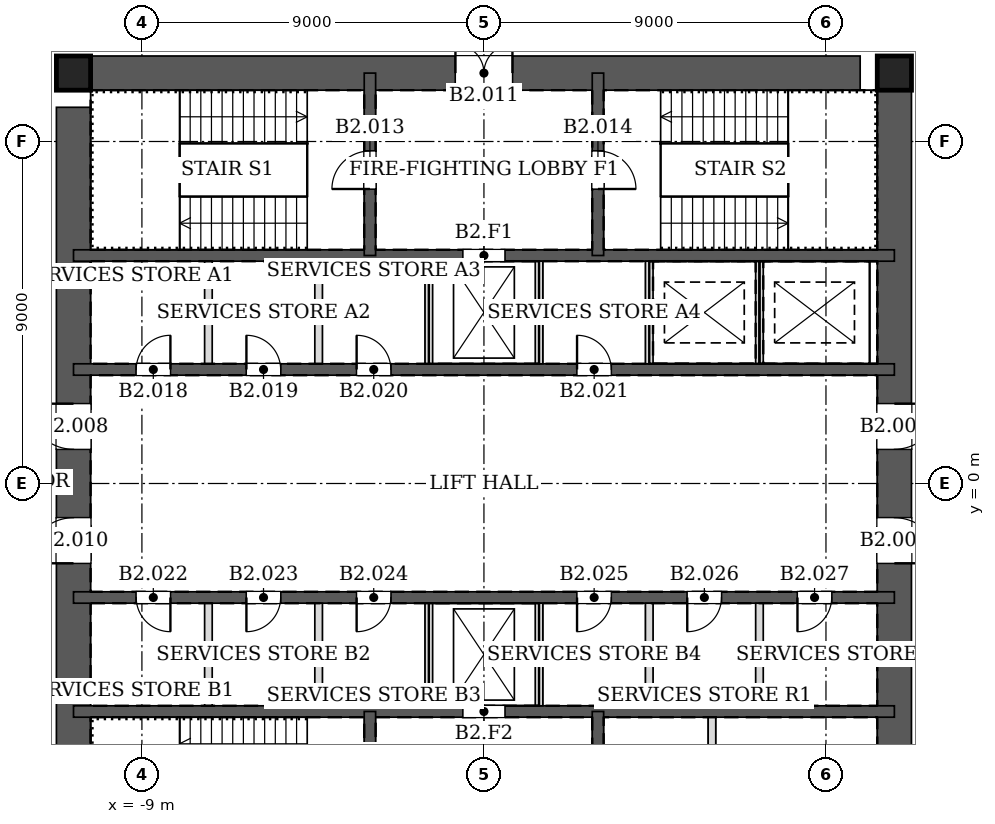
"""IFC4 building model, lengths in metres.
Left out: names, types, materials, properties, quantities, classifications, styles, units other than length and angle.
Written with IfcOpenShell. Run it as: python <this file> out.ifc"""

import sys

from ifc_helpers import new_model, si_unit, direction, frame, frame_2d, origin, origin_2d, place, context, subcontext, project, spatial, rectangle, hollow_rectangle, extrude, element, fill, save


model = new_model("IFC4")
c1 = context("Model", 3, precision=1e-05, world=origin(), true_north=direction((0.0, 1.0)))
c2 = subcontext(c1, "Body", "Model", "MODEL_VIEW")
j1 = project(units=[si_unit("LENGTHUNIT", "METRE"), si_unit("PLANEANGLEUNIT", "RADIAN")], contexts=[c1])
p1 = place(None, origin())
s1 = spatial("IfcSite", under=j1, at=p1, CompositionType="ELEMENT")
p2 = place(p1, origin())
s2 = spatial("IfcBuilding", under=s1, at=p2, CompositionType="ELEMENT")
p3 = place(p2, frame((0.0, 0.0, -9.0)))
s3 = spatial("IfcBuildingStorey", under=s2, at=p3, CompositionType="ELEMENT", Elevation=-9.0)
for number, where, z_axis, x_axis in (
    (1, (10.8, 10.8, -0.35), (0.0, 0.0, 1.0), (1.0, 0.0, 0.0)),
    (2, (-10.8, 10.8, -0.35), (0.0, 0.0, 1.0), (1.0, 0.0, 0.0)),
):
    element("IfcColumn", number, at=place(p3, frame(where, z_axis=z_axis, x_axis=x_axis)), inside=s3, PredefinedType="COLUMN", context=c2, shape_type="SweptSolid", body=[
        extrude(hollow_rectangle(XDim=0.9, YDim=0.9, WallThickness=0.06, at=origin_2d()), origin(), (0.0, 0.0, 1.0), 4.85),
    ])
p4 = place(p3, frame((10.8, -10.8, -0.35), z_axis=(0.0, 0.0, 1.0), x_axis=(0.0, 1.0, 0.0)))
e3 = element("IfcWall", 3, at=p4, inside=s3, PredefinedType="SOLIDWALL", context=c2, shape_type="SweptSolid", body=[
    extrude(rectangle(XDim=21.6, YDim=0.9, at=frame_2d((10.8, 0.0))), origin(), (0.0, 0.0, 1.0), 4.85),
])
p5 = place(p4, frame((11.7, 0.0, 0.35)))
e4 = element("IfcOpeningElement", 4, at=p5, cuts=e3, PredefinedType="OPENING", context=c2, shape_type="SweptSolid", body=[
    extrude(rectangle(XDim=1.2, YDim=2.1, at=frame_2d((0.6, 1.05))), frame((0.0, 0.46, 0.0), z_axis=(0.0, -1.0, 0.0), x_axis=(1.0, 0.0, 0.0)), (0.0, 0.0, 1.0), 0.92),
])
p6 = place(p4, frame((8.7, 0.0, 0.35)))
e5 = element("IfcOpeningElement", 5, at=p6, cuts=e3, PredefinedType="OPENING", context=c2, shape_type="SweptSolid", body=[
    extrude(rectangle(XDim=1.2, YDim=2.1, at=frame_2d((0.6, 1.05))), frame((0.0, 0.46, 0.0), z_axis=(0.0, -1.0, 0.0), x_axis=(1.0, 0.0, 0.0)), (0.0, 0.0, 1.0), 0.92),
])
p7 = place(p3, frame((10.8, 10.8, -0.35), z_axis=(0.0, 0.0, 1.0), x_axis=(-1.0, 0.0, 0.0)))
e6 = element("IfcWall", 6, at=p7, inside=s3, PredefinedType="SOLIDWALL", context=c2, shape_type="SweptSolid", body=[
    extrude(rectangle(XDim=21.6, YDim=0.9, at=frame_2d((10.8, 0.0))), origin(), (0.0, 0.0, 1.0), 4.85),
])
p8 = place(p7, frame((10.05, 0.0, 0.35)))
e7 = element("IfcOpeningElement", 7, at=p8, cuts=e6, PredefinedType="OPENING", context=c2, shape_type="SweptSolid", body=[
    extrude(rectangle(XDim=1.5, YDim=2.1, at=frame_2d((0.75, 1.05))), frame((0.0, 0.46, 0.0), z_axis=(0.0, -1.0, 0.0), x_axis=(1.0, 0.0, 0.0)), (0.0, 0.0, 1.0), 0.92),
])
p9 = place(p3, frame((-10.8, 10.8, -0.35), z_axis=(0.0, 0.0, 1.0), x_axis=(0.0, -1.0, 0.0)))
e8 = element("IfcWall", 8, at=p9, inside=s3, PredefinedType="SOLIDWALL", context=c2, shape_type="SweptSolid", body=[
    extrude(rectangle(XDim=21.6, YDim=0.9, at=frame_2d((10.8, 0.0))), origin(), (0.0, 0.0, 1.0), 4.85),
])
p10 = place(p9, frame((8.7, 0.0, 0.35)))
e9 = element("IfcOpeningElement", 9, at=p10, cuts=e8, PredefinedType="OPENING", context=c2, shape_type="SweptSolid", body=[
    extrude(rectangle(XDim=1.2, YDim=2.1, at=frame_2d((0.6, 1.05))), frame((0.0, 0.46, 0.0), z_axis=(0.0, -1.0, 0.0), x_axis=(1.0, 0.0, 0.0)), (0.0, 0.0, 1.0), 0.92),
])
p11 = place(p9, frame((11.7, 0.0, 0.35)))
e10 = element("IfcOpeningElement", 10, at=p11, cuts=e8, PredefinedType="OPENING", context=c2, shape_type="SweptSolid", body=[
    extrude(rectangle(XDim=1.2, YDim=2.1, at=frame_2d((0.6, 1.05))), frame((0.0, 0.46, 0.0), z_axis=(0.0, -1.0, 0.0), x_axis=(1.0, 0.0, 0.0)), (0.0, 0.0, 1.0), 0.92),
])
p12 = place(p3, frame((-10.8, 3.0, -0.35), z_axis=(0.0, 0.0, 1.0), x_axis=(1.0, 0.0, 0.0)))
e11 = element("IfcWall", 11, at=p12, inside=s3, PredefinedType="SOLIDWALL", context=c2, shape_type="SweptSolid", body=[
    extrude(rectangle(XDim=21.6, YDim=0.3, at=frame_2d((10.8, 0.0))), origin(), (0.0, 0.0, 1.0), 4.85),
])
p13 = place(p12, frame((1.65, 0.0, 0.35)))
e12 = element("IfcOpeningElement", 12, at=p13, cuts=e11, PredefinedType="OPENING", context=c2, shape_type="SweptSolid", body=[
    extrude(rectangle(XDim=0.9, YDim=2.1, at=frame_2d((0.45, 1.05))), frame((0.0, 0.16, 0.0), z_axis=(0.0, -1.0, 0.0), x_axis=(1.0, 0.0, 0.0)), (0.0, 0.0, 1.0), 0.32),
])
p14 = place(p12, frame((4.55, 0.0, 0.35)))
e13 = element("IfcOpeningElement", 13, at=p14, cuts=e11, PredefinedType="OPENING", context=c2, shape_type="SweptSolid", body=[
    extrude(rectangle(XDim=0.9, YDim=2.1, at=frame_2d((0.45, 1.05))), frame((0.0, 0.16, 0.0), z_axis=(0.0, -1.0, 0.0), x_axis=(1.0, 0.0, 0.0)), (0.0, 0.0, 1.0), 0.32),
])
p15 = place(p12, frame((7.45, 0.0, 0.35)))
e14 = element("IfcOpeningElement", 14, at=p15, cuts=e11, PredefinedType="OPENING", context=c2, shape_type="SweptSolid", body=[
    extrude(rectangle(XDim=0.9, YDim=2.1, at=frame_2d((0.45, 1.05))), frame((0.0, 0.16, 0.0), z_axis=(0.0, -1.0, 0.0), x_axis=(1.0, 0.0, 0.0)), (0.0, 0.0, 1.0), 0.32),
])
p16 = place(p12, frame((13.25, 0.0, 0.35)))
e15 = element("IfcOpeningElement", 15, at=p16, cuts=e11, PredefinedType="OPENING", context=c2, shape_type="SweptSolid", body=[
    extrude(rectangle(XDim=0.9, YDim=2.1, at=frame_2d((0.45, 1.05))), frame((0.0, 0.16, 0.0), z_axis=(0.0, -1.0, 0.0), x_axis=(1.0, 0.0, 0.0)), (0.0, 0.0, 1.0), 0.32),
])
p17 = place(p3, frame((-10.8, 6.0, -0.35), z_axis=(0.0, 0.0, 1.0), x_axis=(1.0, 0.0, 0.0)))
e16 = element("IfcWall", 16, at=p17, inside=s3, PredefinedType="SOLIDWALL", context=c2, shape_type="SweptSolid", body=[
    extrude(rectangle(XDim=21.6, YDim=0.3, at=frame_2d((10.8, 0.0))), origin(), (0.0, 0.0, 1.0), 4.85),
])
p18 = place(p17, frame((10.25, 0.0, 0.35)))
e17 = element("IfcOpeningElement", 17, at=p18, cuts=e16, PredefinedType="OPENING", context=c2, shape_type="SweptSolid", body=[
    extrude(rectangle(XDim=1.1, YDim=2.1, at=frame_2d((0.55, 1.05))), frame((0.0, 0.16, 0.0), z_axis=(0.0, -1.0, 0.0), x_axis=(1.0, 0.0, 0.0)), (0.0, 0.0, 1.0), 0.32),
])
p19 = place(p3, frame((-3.0, 6.0, -0.35), z_axis=(0.0, 0.0, 1.0), x_axis=(0.0, 1.0, 0.0)))
e18 = element("IfcWall", 18, at=p19, inside=s3, PredefinedType="SOLIDWALL", context=c2, shape_type="SweptSolid", body=[
    extrude(rectangle(XDim=4.8, YDim=0.3, at=frame_2d((2.4, 0.0))), origin(), (0.0, 0.0, 1.0), 4.85),
])
p20 = place(p19, frame((1.75, 0.0, 0.35)))
e19 = element("IfcOpeningElement", 19, at=p20, cuts=e18, PredefinedType="OPENING", context=c2, shape_type="SweptSolid", body=[
    extrude(rectangle(XDim=1.0, YDim=2.1, at=frame_2d((0.5, 1.05))), frame((0.0, 0.16, 0.0), z_axis=(0.0, -1.0, 0.0), x_axis=(1.0, 0.0, 0.0)), (0.0, 0.0, 1.0), 0.32),
])
p21 = place(p3, frame((3.0, 6.0, -0.35), z_axis=(0.0, 0.0, 1.0), x_axis=(0.0, 1.0, 0.0)))
e20 = element("IfcWall", 20, at=p21, inside=s3, PredefinedType="SOLIDWALL", context=c2, shape_type="SweptSolid", body=[
    extrude(rectangle(XDim=4.8, YDim=0.3, at=frame_2d((2.4, 0.0))), origin(), (0.0, 0.0, 1.0), 4.85),
])
p22 = place(p21, frame((1.75, 0.0, 0.35)))
e21 = element("IfcOpeningElement", 21, at=p22, cuts=e20, PredefinedType="OPENING", context=c2, shape_type="SweptSolid", body=[
    extrude(rectangle(XDim=1.0, YDim=2.1, at=frame_2d((0.5, 1.05))), frame((0.0, 0.16, 0.0), z_axis=(0.0, -1.0, 0.0), x_axis=(1.0, 0.0, 0.0)), (0.0, 0.0, 1.0), 0.32),
])
p23 = place(p3, frame((-10.8, -3.0, -0.35), z_axis=(0.0, 0.0, 1.0), x_axis=(1.0, 0.0, 0.0)))
e22 = element("IfcWall", 22, at=p23, inside=s3, PredefinedType="SOLIDWALL", context=c2, shape_type="SweptSolid", body=[
    extrude(rectangle(XDim=21.6, YDim=0.3, at=frame_2d((10.8, 0.0))), origin(), (0.0, 0.0, 1.0), 4.85),
])
p24 = place(p23, frame((1.65, 0.0, 0.35)))
e23 = element("IfcOpeningElement", 23, at=p24, cuts=e22, PredefinedType="OPENING", context=c2, shape_type="SweptSolid", body=[
    extrude(rectangle(XDim=0.9, YDim=2.1, at=frame_2d((0.45, 1.05))), frame((0.0, 0.16, 0.0), z_axis=(0.0, -1.0, 0.0), x_axis=(1.0, 0.0, 0.0)), (0.0, 0.0, 1.0), 0.32),
])
p25 = place(p23, frame((4.55, 0.0, 0.35)))
e24 = element("IfcOpeningElement", 24, at=p25, cuts=e22, PredefinedType="OPENING", context=c2, shape_type="SweptSolid", body=[
    extrude(rectangle(XDim=0.9, YDim=2.1, at=frame_2d((0.45, 1.05))), frame((0.0, 0.16, 0.0), z_axis=(0.0, -1.0, 0.0), x_axis=(1.0, 0.0, 0.0)), (0.0, 0.0, 1.0), 0.32),
])
p26 = place(p23, frame((7.45, 0.0, 0.35)))
e25 = element("IfcOpeningElement", 25, at=p26, cuts=e22, PredefinedType="OPENING", context=c2, shape_type="SweptSolid", body=[
    extrude(rectangle(XDim=0.9, YDim=2.1, at=frame_2d((0.45, 1.05))), frame((0.0, 0.16, 0.0), z_axis=(0.0, -1.0, 0.0), x_axis=(1.0, 0.0, 0.0)), (0.0, 0.0, 1.0), 0.32),
])
p27 = place(p23, frame((13.25, 0.0, 0.35)))
e26 = element("IfcOpeningElement", 26, at=p27, cuts=e22, PredefinedType="OPENING", context=c2, shape_type="SweptSolid", body=[
    extrude(rectangle(XDim=0.9, YDim=2.1, at=frame_2d((0.45, 1.05))), frame((0.0, 0.16, 0.0), z_axis=(0.0, -1.0, 0.0), x_axis=(1.0, 0.0, 0.0)), (0.0, 0.0, 1.0), 0.32),
])
p28 = place(p23, frame((16.15, 0.0, 0.35)))
e27 = element("IfcOpeningElement", 27, at=p28, cuts=e22, PredefinedType="OPENING", context=c2, shape_type="SweptSolid", body=[
    extrude(rectangle(XDim=0.9, YDim=2.1, at=frame_2d((0.45, 1.05))), frame((0.0, 0.16, 0.0), z_axis=(0.0, -1.0, 0.0), x_axis=(1.0, 0.0, 0.0)), (0.0, 0.0, 1.0), 0.32),
])
p29 = place(p23, frame((19.05, 0.0, 0.35)))
e28 = element("IfcOpeningElement", 28, at=p29, cuts=e22, PredefinedType="OPENING", context=c2, shape_type="SweptSolid", body=[
    extrude(rectangle(XDim=0.9, YDim=2.1, at=frame_2d((0.45, 1.05))), frame((0.0, 0.16, 0.0), z_axis=(0.0, -1.0, 0.0), x_axis=(1.0, 0.0, 0.0)), (0.0, 0.0, 1.0), 0.32),
])
p30 = place(p3, frame((-10.8, -6.0, -0.35), z_axis=(0.0, 0.0, 1.0), x_axis=(1.0, 0.0, 0.0)))
e29 = element("IfcWall", 29, at=p30, inside=s3, PredefinedType="SOLIDWALL", context=c2, shape_type="SweptSolid", body=[
    extrude(rectangle(XDim=21.6, YDim=0.3, at=frame_2d((10.8, 0.0))), origin(), (0.0, 0.0, 1.0), 4.85),
])
p31 = place(p30, frame((10.25, 0.0, 0.35)))
e30 = element("IfcOpeningElement", 30, at=p31, cuts=e29, PredefinedType="OPENING", context=c2, shape_type="SweptSolid", body=[
    extrude(rectangle(XDim=1.1, YDim=2.1, at=frame_2d((0.55, 1.05))), frame((0.0, 0.16, 0.0), z_axis=(0.0, -1.0, 0.0), x_axis=(1.0, 0.0, 0.0)), (0.0, 0.0, 1.0), 0.32),
])
p32 = place(p3, frame((-3.0, -6.0, -0.35), z_axis=(0.0, 0.0, 1.0), x_axis=(0.0, -1.0, 0.0)))
e31 = element("IfcWall", 31, at=p32, inside=s3, PredefinedType="SOLIDWALL", context=c2, shape_type="SweptSolid", body=[
    extrude(rectangle(XDim=4.8, YDim=0.3, at=frame_2d((2.4, 0.0))), origin(), (0.0, 0.0, 1.0), 4.85),
])
p33 = place(p32, frame((1.75, 0.0, 0.35)))
e32 = element("IfcOpeningElement", 32, at=p33, cuts=e31, PredefinedType="OPENING", context=c2, shape_type="SweptSolid", body=[
    extrude(rectangle(XDim=1.0, YDim=2.1, at=frame_2d((0.5, 1.05))), frame((0.0, 0.16, 0.0), z_axis=(0.0, -1.0, 0.0), x_axis=(1.0, 0.0, 0.0)), (0.0, 0.0, 1.0), 0.32),
])
p34 = place(p3, frame((3.0, -6.0, -0.35), z_axis=(0.0, 0.0, 1.0), x_axis=(0.0, -1.0, 0.0)))
e33 = element("IfcWall", 33, at=p34, inside=s3, PredefinedType="SOLIDWALL", context=c2, shape_type="SweptSolid", body=[
    extrude(rectangle(XDim=4.8, YDim=0.3, at=frame_2d((2.4, 0.0))), origin(), (0.0, 0.0, 1.0), 4.85),
])
for number, where, z_axis, x_axis in (
    (34, (-7.25, 3.15, 0.0), (0.0, 0.0, 1.0), (0.0, 1.0, 0.0)),
    (35, (-4.35, 3.15, 0.0), (0.0, 0.0, 1.0), (0.0, 1.0, 0.0)),
    (36, (-1.45, 3.15, 0.0), (0.0, 0.0, 1.0), (0.0, 1.0, 0.0)),
    (37, (1.45, 3.15, 0.0), (0.0, 0.0, 1.0), (0.0, 1.0, 0.0)),
    (38, (4.35, 3.15, 0.0), (0.0, 0.0, 1.0), (0.0, 1.0, 0.0)),
):
    element("IfcWall", number, at=place(p3, frame(where, z_axis=z_axis, x_axis=x_axis)), inside=s3, PredefinedType="PARTITIONING", context=c2, shape_type="SweptSolid", body=[
        extrude(rectangle(XDim=2.7, YDim=0.2, at=frame_2d((1.35, 0.0))), origin(), (0.0, 0.0, 1.0), 4.2),
    ])
p35 = place(p3, frame((7.25, 3.15, 0.0), z_axis=(0.0, 0.0, 1.0), x_axis=(0.0, 1.0, 0.0)))
e39 = element("IfcWall", 39, at=p35, inside=s3, PredefinedType="PARTITIONING", context=c2, shape_type="SweptSolid", body=[
    extrude(rectangle(XDim=2.7, YDim=0.2, at=frame_2d((1.35, 0.0))), origin(), (0.0, 0.0, 1.0), 4.5),
])
for number, where, z_axis, x_axis in (
    (40, (-7.25, -5.85, 0.0), (0.0, 0.0, 1.0), (0.0, 1.0, 0.0)),
    (41, (-4.35, -5.85, 0.0), (0.0, 0.0, 1.0), (0.0, 1.0, 0.0)),
    (42, (-1.45, -5.85, 0.0), (0.0, 0.0, 1.0), (0.0, 1.0, 0.0)),
    (43, (1.45, -5.85, 0.0), (0.0, 0.0, 1.0), (0.0, 1.0, 0.0)),
    (44, (4.35, -5.85, 0.0), (0.0, 0.0, 1.0), (0.0, 1.0, 0.0)),
    (45, (7.25, -5.85, 0.0), (0.0, 0.0, 1.0), (0.0, 1.0, 0.0)),
):
    element("IfcWall", number, at=place(p3, frame(where, z_axis=z_axis, x_axis=x_axis)), inside=s3, PredefinedType="PARTITIONING", context=c2, shape_type="SweptSolid", body=[
        extrude(rectangle(XDim=2.7, YDim=0.2, at=frame_2d((1.35, 0.0))), origin(), (0.0, 0.0, 1.0), 4.2),
    ])
p36 = place(p3, frame((6.0, -10.35, 0.0), z_axis=(0.0, 0.0, 1.0), x_axis=(0.0, 1.0, 0.0)))
e46 = element("IfcWall", 46, at=p36, inside=s3, PredefinedType="PARTITIONING", context=c2, shape_type="SweptSolid", body=[
    extrude(rectangle(XDim=4.2, YDim=0.2, at=frame_2d((2.1, 0.0))), origin(), (0.0, 0.0, 1.0), 4.2),
])
p37 = place(p36, frame((0.3, 0.0, 0.0)))
e47 = element("IfcOpeningElement", 47, at=p37, cuts=e46, PredefinedType="OPENING", context=c2, shape_type="SweptSolid", body=[
    extrude(rectangle(XDim=0.9, YDim=2.1, at=frame_2d((0.45, 1.05))), frame((0.0, 0.11, 0.0), z_axis=(0.0, -1.0, 0.0), x_axis=(1.0, 0.0, 0.0)), (0.0, 0.0, 1.0), 0.22),
])
p38 = place(p5, frame((1.2, 0.0, 0.0), z_axis=(0.0, 0.0, 1.0), x_axis=(-1.0, 0.0, 0.0)))
e48 = element("IfcDoor", 48, at=p38, inside=s3, OperationType="SINGLE_SWING_LEFT", PredefinedType="DOOR", context=c2, shape_type="SweptSolid", body=[
    extrude(rectangle(XDim=1.2, YDim=2.1, at=frame_2d((0.6, 1.05))), frame((0.0, 0.025, 0.0), z_axis=(0.0, -1.0, 0.0), x_axis=(1.0, 0.0, 0.0)), (0.0, 0.0, 1.0), 0.05),
])
fill(e4, e48)
p39 = place(p10, frame((1.2, 0.0, 0.0), z_axis=(0.0, 0.0, 1.0), x_axis=(-1.0, 0.0, 0.0)))
e49 = element("IfcDoor", 49, at=p39, inside=s3, OperationType="SINGLE_SWING_RIGHT", PredefinedType="DOOR", context=c2, shape_type="SweptSolid", body=[
    extrude(rectangle(XDim=1.2, YDim=2.1, at=frame_2d((0.6, 1.05))), frame((0.0, 0.025, 0.0), z_axis=(0.0, -1.0, 0.0), x_axis=(1.0, 0.0, 0.0)), (0.0, 0.0, 1.0), 0.05),
])
fill(e9, e49)
p40 = place(p6, frame((1.2, 0.0, 0.0), z_axis=(0.0, 0.0, 1.0), x_axis=(-1.0, 0.0, 0.0)))
e50 = element("IfcDoor", 50, at=p40, inside=s3, OperationType="SINGLE_SWING_RIGHT", PredefinedType="DOOR", context=c2, shape_type="SweptSolid", body=[
    extrude(rectangle(XDim=1.2, YDim=2.1, at=frame_2d((0.6, 1.05))), frame((0.0, 0.025, 0.0), z_axis=(0.0, -1.0, 0.0), x_axis=(1.0, 0.0, 0.0)), (0.0, 0.0, 1.0), 0.05),
])
fill(e5, e50)
p41 = place(p11, frame((1.2, 0.0, 0.0), z_axis=(0.0, 0.0, 1.0), x_axis=(-1.0, 0.0, 0.0)))
e51 = element("IfcDoor", 51, at=p41, inside=s3, OperationType="SINGLE_SWING_LEFT", PredefinedType="DOOR", context=c2, shape_type="SweptSolid", body=[
    extrude(rectangle(XDim=1.2, YDim=2.1, at=frame_2d((0.6, 1.05))), frame((0.0, 0.025, 0.0), z_axis=(0.0, -1.0, 0.0), x_axis=(1.0, 0.0, 0.0)), (0.0, 0.0, 1.0), 0.05),
])
fill(e10, e51)
p42 = place(p8, frame((1.5, 0.0, 0.0), z_axis=(0.0, 0.0, 1.0), x_axis=(-1.0, 0.0, 0.0)))
e52 = element("IfcDoor", 52, at=p42, inside=s3, OperationType="DOUBLE_DOOR_SINGLE_SWING", PredefinedType="DOOR", context=c2, shape_type="SweptSolid", body=[
    extrude(rectangle(XDim=1.5, YDim=2.1, at=frame_2d((0.75, 1.05))), frame((0.0, 0.025, 0.0), z_axis=(0.0, -1.0, 0.0), x_axis=(1.0, 0.0, 0.0)), (0.0, 0.0, 1.0), 0.05),
])
fill(e7, e52)
p43 = place(p20, origin())
e53 = element("IfcDoor", 53, at=p43, inside=s3, OperationType="SINGLE_SWING_LEFT", PredefinedType="DOOR", context=c2, shape_type="SweptSolid", body=[
    extrude(rectangle(XDim=1.0, YDim=2.1, at=frame_2d((0.5, 1.05))), frame((0.0, 0.025, 0.0), z_axis=(0.0, -1.0, 0.0), x_axis=(1.0, 0.0, 0.0)), (0.0, 0.0, 1.0), 0.05),
])
fill(e19, e53)
p44 = place(p22, frame((1.0, 0.0, 0.0), z_axis=(0.0, 0.0, 1.0), x_axis=(-1.0, 0.0, 0.0)))
e54 = element("IfcDoor", 54, at=p44, inside=s3, OperationType="SINGLE_SWING_RIGHT", PredefinedType="DOOR", context=c2, shape_type="SweptSolid", body=[
    extrude(rectangle(XDim=1.0, YDim=2.1, at=frame_2d((0.5, 1.05))), frame((0.0, 0.025, 0.0), z_axis=(0.0, -1.0, 0.0), x_axis=(1.0, 0.0, 0.0)), (0.0, 0.0, 1.0), 0.05),
])
fill(e21, e54)
p45 = place(p13, origin())
e55 = element("IfcDoor", 55, at=p45, inside=s3, OperationType="SINGLE_SWING_RIGHT", PredefinedType="DOOR", context=c2, shape_type="SweptSolid", body=[
    extrude(rectangle(XDim=0.9, YDim=2.1, at=frame_2d((0.45, 1.05))), frame((0.0, 0.025, 0.0), z_axis=(0.0, -1.0, 0.0), x_axis=(1.0, 0.0, 0.0)), (0.0, 0.0, 1.0), 0.05),
])
fill(e12, e55)
p46 = place(p14, origin())
e56 = element("IfcDoor", 56, at=p46, inside=s3, OperationType="SINGLE_SWING_LEFT", PredefinedType="DOOR", context=c2, shape_type="SweptSolid", body=[
    extrude(rectangle(XDim=0.9, YDim=2.1, at=frame_2d((0.45, 1.05))), frame((0.0, 0.025, 0.0), z_axis=(0.0, -1.0, 0.0), x_axis=(1.0, 0.0, 0.0)), (0.0, 0.0, 1.0), 0.05),
])
fill(e13, e56)
p47 = place(p15, origin())
e57 = element("IfcDoor", 57, at=p47, inside=s3, OperationType="SINGLE_SWING_LEFT", PredefinedType="DOOR", context=c2, shape_type="SweptSolid", body=[
    extrude(rectangle(XDim=0.9, YDim=2.1, at=frame_2d((0.45, 1.05))), frame((0.0, 0.025, 0.0), z_axis=(0.0, -1.0, 0.0), x_axis=(1.0, 0.0, 0.0)), (0.0, 0.0, 1.0), 0.05),
])
fill(e14, e57)
p48 = place(p16, origin())
e58 = element("IfcDoor", 58, at=p48, inside=s3, OperationType="SINGLE_SWING_LEFT", PredefinedType="DOOR", context=c2, shape_type="SweptSolid", body=[
    extrude(rectangle(XDim=0.9, YDim=2.1, at=frame_2d((0.45, 1.05))), frame((0.0, 0.025, 0.0), z_axis=(0.0, -1.0, 0.0), x_axis=(1.0, 0.0, 0.0)), (0.0, 0.0, 1.0), 0.05),
])
fill(e15, e58)
p49 = place(p24, frame((0.9, 0.0, 0.0), z_axis=(0.0, 0.0, 1.0), x_axis=(-1.0, 0.0, 0.0)))
e59 = element("IfcDoor", 59, at=p49, inside=s3, OperationType="SINGLE_SWING_LEFT", PredefinedType="DOOR", context=c2, shape_type="SweptSolid", body=[
    extrude(rectangle(XDim=0.9, YDim=2.1, at=frame_2d((0.45, 1.05))), frame((0.0, 0.025, 0.0), z_axis=(0.0, -1.0, 0.0), x_axis=(1.0, 0.0, 0.0)), (0.0, 0.0, 1.0), 0.05),
])
fill(e23, e59)
p50 = place(p25, frame((0.9, 0.0, 0.0), z_axis=(0.0, 0.0, 1.0), x_axis=(-1.0, 0.0, 0.0)))
e60 = element("IfcDoor", 60, at=p50, inside=s3, OperationType="SINGLE_SWING_RIGHT", PredefinedType="DOOR", context=c2, shape_type="SweptSolid", body=[
    extrude(rectangle(XDim=0.9, YDim=2.1, at=frame_2d((0.45, 1.05))), frame((0.0, 0.025, 0.0), z_axis=(0.0, -1.0, 0.0), x_axis=(1.0, 0.0, 0.0)), (0.0, 0.0, 1.0), 0.05),
])
fill(e24, e60)
p51 = place(p26, frame((0.9, 0.0, 0.0), z_axis=(0.0, 0.0, 1.0), x_axis=(-1.0, 0.0, 0.0)))
e61 = element("IfcDoor", 61, at=p51, inside=s3, OperationType="SINGLE_SWING_RIGHT", PredefinedType="DOOR", context=c2, shape_type="SweptSolid", body=[
    extrude(rectangle(XDim=0.9, YDim=2.1, at=frame_2d((0.45, 1.05))), frame((0.0, 0.025, 0.0), z_axis=(0.0, -1.0, 0.0), x_axis=(1.0, 0.0, 0.0)), (0.0, 0.0, 1.0), 0.05),
])
fill(e25, e61)
p52 = place(p27, frame((0.9, 0.0, 0.0), z_axis=(0.0, 0.0, 1.0), x_axis=(-1.0, 0.0, 0.0)))
e62 = element("IfcDoor", 62, at=p52, inside=s3, OperationType="SINGLE_SWING_RIGHT", PredefinedType="DOOR", context=c2, shape_type="SweptSolid", body=[
    extrude(rectangle(XDim=0.9, YDim=2.1, at=frame_2d((0.45, 1.05))), frame((0.0, 0.025, 0.0), z_axis=(0.0, -1.0, 0.0), x_axis=(1.0, 0.0, 0.0)), (0.0, 0.0, 1.0), 0.05),
])
fill(e26, e62)
p53 = place(p28, frame((0.9, 0.0, 0.0), z_axis=(0.0, 0.0, 1.0), x_axis=(-1.0, 0.0, 0.0)))
e63 = element("IfcDoor", 63, at=p53, inside=s3, OperationType="SINGLE_SWING_RIGHT", PredefinedType="DOOR", context=c2, shape_type="SweptSolid", body=[
    extrude(rectangle(XDim=0.9, YDim=2.1, at=frame_2d((0.45, 1.05))), frame((0.0, 0.025, 0.0), z_axis=(0.0, -1.0, 0.0), x_axis=(1.0, 0.0, 0.0)), (0.0, 0.0, 1.0), 0.05),
])
fill(e27, e63)
p54 = place(p29, frame((0.9, 0.0, 0.0), z_axis=(0.0, 0.0, 1.0), x_axis=(-1.0, 0.0, 0.0)))
e64 = element("IfcDoor", 64, at=p54, inside=s3, OperationType="SINGLE_SWING_RIGHT", PredefinedType="DOOR", context=c2, shape_type="SweptSolid", body=[
    extrude(rectangle(XDim=0.9, YDim=2.1, at=frame_2d((0.45, 1.05))), frame((0.0, 0.025, 0.0), z_axis=(0.0, -1.0, 0.0), x_axis=(1.0, 0.0, 0.0)), (0.0, 0.0, 1.0), 0.05),
])
fill(e28, e64)
p55 = place(p18, origin())
e65 = element("IfcDoor", 65, at=p55, inside=s3, OperationType="DOUBLE_DOOR_SLIDING", PredefinedType="DOOR", context=c2, shape_type="SweptSolid", body=[
    extrude(rectangle(XDim=1.1, YDim=2.1, at=frame_2d((0.55, 1.05))), frame((0.0, 0.025, 0.0), z_axis=(0.0, -1.0, 0.0), x_axis=(1.0, 0.0, 0.0)), (0.0, 0.0, 1.0), 0.05),
])
fill(e17, e65)
p56 = place(p31, origin())
e66 = element("IfcDoor", 66, at=p56, inside=s3, OperationType="DOUBLE_DOOR_SLIDING", PredefinedType="DOOR", context=c2, shape_type="SweptSolid", body=[
    extrude(rectangle(XDim=1.1, YDim=2.1, at=frame_2d((0.55, 1.05))), frame((0.0, 0.025, 0.0), z_axis=(0.0, -1.0, 0.0), x_axis=(1.0, 0.0, 0.0)), (0.0, 0.0, 1.0), 0.05),
])
fill(e30, e66)
save(model, sys.argv[1])
